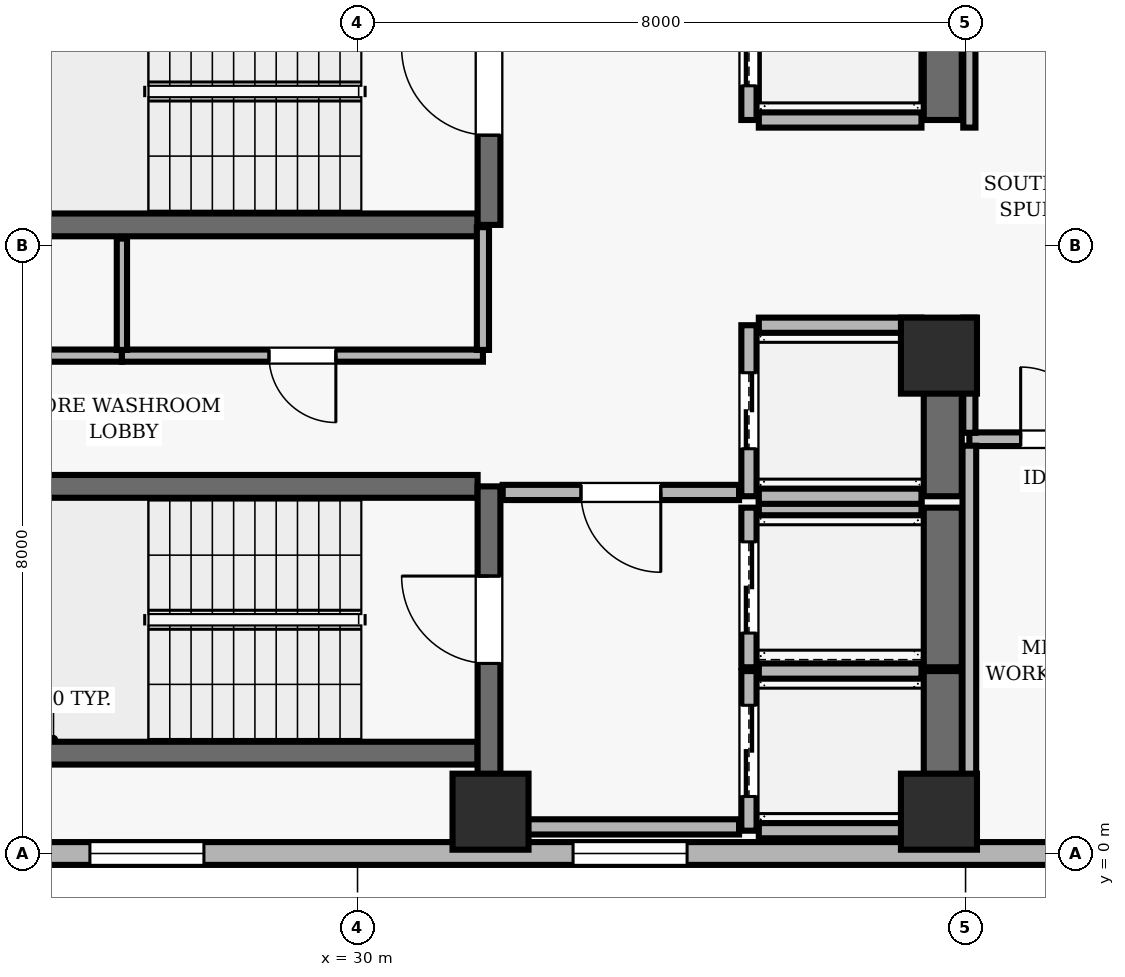
"""IFC4 building model, lengths in metres.
Left out: names, types, materials, properties, quantities, classifications, styles, units other than length and angle.
Written with IfcOpenShell. Run it as: python <this file> out.ifc"""

import sys

from ifc_helpers import new_model, si_unit, direction, frame, frame_2d, origin, origin_2d, place, context, subcontext, project, spatial, rectangle, extrude, element, fill, save


model = new_model("IFC4")
c1 = context("Model", 3, precision=1e-05, world=origin(), true_north=direction((0.0, 1.0)))
c2 = subcontext(c1, "Body", "Model", "MODEL_VIEW")
j1 = project(units=[si_unit("LENGTHUNIT", "METRE"), si_unit("PLANEANGLEUNIT", "RADIAN")], contexts=[c1])
p1 = place(None, origin())
s1 = spatial("IfcSite", under=j1, at=p1, CompositionType="ELEMENT")
p2 = place(p1, origin())
s2 = spatial("IfcBuilding", under=s1, at=p2, CompositionType="ELEMENT")
p3 = place(p2, frame((0.0, 0.0, 203.1)))
s3 = spatial("IfcBuildingStorey", under=s2, at=p3, CompositionType="ELEMENT", Elevation=203.1)
for number, where, z_axis, x_axis in (
    (1, (31.75, 0.55, 0.0), (0.0, 0.0, 1.0), (1.0, 0.0, 0.0)),
    (2, (37.65, 0.55, 0.0), (0.0, 0.0, 1.0), (1.0, 0.0, 0.0)),
    (3, (37.65, 6.55, 0.0), (0.0, 0.0, 1.0), (1.0, 0.0, 0.0)),
):
    element("IfcColumn", number, at=place(p3, frame(where, z_axis=z_axis, x_axis=x_axis)), inside=s3, PredefinedType="COLUMN", context=c2, shape_type="SweptSolid", body=[
        extrude(rectangle(XDim=1.0, YDim=1.0, at=origin_2d()), origin(), (0.0, 0.0, 1.0), 3.9),
    ])
p4 = place(p3, frame((24.5, 0.0, 0.0), z_axis=(0.0, 0.0, 1.0), x_axis=(1.0, 0.0, 0.0)))
e4 = element("IfcWall", 4, at=p4, inside=s3, PredefinedType="SOLIDWALL", context=c2, shape_type="SweptSolid", body=[
    extrude(rectangle(XDim=38.2, YDim=0.3, at=frame_2d((19.1, 0.0))), origin(), (0.0, 0.0, 1.0), 3.69),
])
p5 = place(p4, frame((1.979, 0.0, 0.9)))
e5 = element("IfcOpeningElement", 5, at=p5, cuts=e4, PredefinedType="OPENING", context=c2, shape_type="SweptSolid", body=[
    extrude(rectangle(XDim=1.5, YDim=1.6, at=frame_2d((0.75, 0.8))), frame((0.0, 0.16, 0.0), z_axis=(0.0, -1.0, 0.0), x_axis=(1.0, 0.0, 0.0)), (0.0, 0.0, 1.0), 0.32),
])
p6 = place(p4, frame((8.336, 0.0, 0.9)))
e6 = element("IfcOpeningElement", 6, at=p6, cuts=e4, PredefinedType="OPENING", context=c2, shape_type="SweptSolid", body=[
    extrude(rectangle(XDim=1.5, YDim=1.6, at=frame_2d((0.75, 0.8))), frame((0.0, 0.16, 0.0), z_axis=(0.0, -1.0, 0.0), x_axis=(1.0, 0.0, 0.0)), (0.0, 0.0, 1.0), 0.32),
])
p7 = place(p4, frame((18.35, 0.0, 0.9)))
e7 = element("IfcOpeningElement", 7, at=p7, cuts=e4, PredefinedType="OPENING", context=c2, shape_type="SweptSolid", body=[
    extrude(rectangle(XDim=1.5, YDim=1.6, at=frame_2d((0.75, 0.8))), frame((0.0, 0.16, 0.0), z_axis=(0.0, -1.0, 0.0), x_axis=(1.0, 0.0, 0.0)), (0.0, 0.0, 1.0), 0.32),
])
p8 = place(p4, frame((23.807, 0.0, 0.9)))
e8 = element("IfcOpeningElement", 8, at=p8, cuts=e4, PredefinedType="OPENING", context=c2, shape_type="SweptSolid", body=[
    extrude(rectangle(XDim=1.5, YDim=1.6, at=frame_2d((0.75, 0.8))), frame((0.0, 0.16, 0.0), z_axis=(0.0, -1.0, 0.0), x_axis=(1.0, 0.0, 0.0)), (0.0, 0.0, 1.0), 0.32),
])
p9 = place(p4, frame((29.714, 0.0, 0.9)))
e9 = element("IfcOpeningElement", 9, at=p9, cuts=e4, PredefinedType="OPENING", context=c2, shape_type="SweptSolid", body=[
    extrude(rectangle(XDim=1.5, YDim=1.6, at=frame_2d((0.75, 0.8))), frame((0.0, 0.16, 0.0), z_axis=(0.0, -1.0, 0.0), x_axis=(1.0, 0.0, 0.0)), (0.0, 0.0, 1.0), 0.32),
])
p10 = place(p4, frame((35.621, 0.0, 0.9)))
e10 = element("IfcOpeningElement", 10, at=p10, cuts=e4, PredefinedType="OPENING", context=c2, shape_type="SweptSolid", body=[
    extrude(rectangle(XDim=1.5, YDim=1.6, at=frame_2d((0.75, 0.8))), frame((0.0, 0.16, 0.0), z_axis=(0.0, -1.0, 0.0), x_axis=(1.0, 0.0, 0.0)), (0.0, 0.0, 1.0), 0.32),
])
for number, where, z_axis, x_axis in (
    (11, (31.58, 4.83, 0.0), (0.0, 0.0, 1.0), (-1.0, 0.0, 0.0)),
    (12, (23.22, 1.32, 0.0), (0.0, 0.0, 1.0), (1.0, 0.0, 0.0)),
):
    element("IfcWall", number, at=place(p3, frame(where, z_axis=z_axis, x_axis=x_axis)), inside=s3, PredefinedType="SHEAR", context=c2, shape_type="SweptSolid", body=[
        extrude(rectangle(XDim=8.36, YDim=0.3, at=frame_2d((4.18, 0.0))), origin(), (0.0, 0.0, 1.0), 3.69),
    ])
p11 = place(p3, frame((31.73, 0.96, 0.0), z_axis=(0.0, 0.0, 1.0), x_axis=(0.0, 1.0, 0.0)))
e13 = element("IfcWall", 13, at=p11, inside=s3, PredefinedType="SHEAR", context=c2, shape_type="SweptSolid", body=[
    extrude(rectangle(XDim=3.87, YDim=0.3, at=frame_2d((1.935, 0.0))), origin(), (0.0, 0.0, 1.0), 3.69),
])
p12 = place(p11, frame((1.54, 0.0, 0.0)))
e14 = element("IfcOpeningElement", 14, at=p12, cuts=e13, PredefinedType="OPENING", context=c2, shape_type="SweptSolid", body=[
    extrude(rectangle(XDim=1.15, YDim=2.15, at=frame_2d((0.575, 1.075))), frame((0.0, 0.16, 0.0), z_axis=(0.0, -1.0, 0.0), x_axis=(1.0, 0.0, 0.0)), (0.0, 0.0, 1.0), 0.32),
])
p13 = place(p3, frame((23.22, 8.27, 0.0), z_axis=(0.0, 0.0, 1.0), x_axis=(1.0, 0.0, 0.0)))
e15 = element("IfcWall", 15, at=p13, inside=s3, PredefinedType="SHEAR", context=c2, shape_type="SweptSolid", body=[
    extrude(rectangle(XDim=8.36, YDim=0.3, at=frame_2d((4.18, 0.0))), origin(), (0.0, 0.0, 1.0), 3.69),
])
p14 = place(p3, frame((31.73, 8.27, 0.0), z_axis=(0.0, 0.0, 1.0), x_axis=(0.0, 1.0, 0.0)))
e16 = element("IfcWall", 16, at=p14, inside=s3, PredefinedType="SHEAR", context=c2, shape_type="SweptSolid", body=[
    extrude(rectangle(XDim=3.51, YDim=0.3, at=frame_2d((1.755, 0.0))), origin(), (0.0, 0.0, 1.0), 3.69),
])
p15 = place(p14, frame((1.18, 0.0, 0.0)))
e17 = element("IfcOpeningElement", 17, at=p15, cuts=e16, PredefinedType="OPENING", context=c2, shape_type="SweptSolid", body=[
    extrude(rectangle(XDim=1.15, YDim=2.15, at=frame_2d((0.575, 1.075))), frame((0.0, 0.16, 0.0), z_axis=(0.0, -1.0, 0.0), x_axis=(1.0, 0.0, 0.0)), (0.0, 0.0, 1.0), 0.32),
])
p16 = place(p3, frame((35.15, 2.4, 0.0), z_axis=(0.0, 0.0, 1.0), x_axis=(0.0, -1.0, 0.0)))
e18 = element("IfcWall", 18, at=p16, inside=s3, PredefinedType="SOLIDWALL", context=c2, shape_type="SweptSolid", body=[
    extrude(rectangle(XDim=2.1, YDim=0.2, at=frame_2d((1.05, 0.0))), origin(), (0.0, 0.0, 1.0), 3.69),
])
p17 = place(p16, frame((0.45, 0.0, 0.0)))
e19 = element("IfcOpeningElement", 19, at=p17, cuts=e18, PredefinedType="OPENING", context=c2, shape_type="SweptSolid", body=[
    extrude(rectangle(XDim=1.2, YDim=2.15, at=frame_2d((0.6, 1.075))), frame((0.0, 0.11, 0.0), z_axis=(0.0, -1.0, 0.0), x_axis=(1.0, 0.0, 0.0)), (0.0, 0.0, 1.0), 0.22),
])
p18 = place(p3, frame((37.7, 0.3, 0.0), z_axis=(0.0, 0.0, 1.0), x_axis=(0.0, 1.0, 0.0)))
e20 = element("IfcWall", 20, at=p18, inside=s3, PredefinedType="SHEAR", context=c2, shape_type="SweptSolid", body=[
    extrude(rectangle(XDim=2.1, YDim=0.5, at=frame_2d((1.05, 0.0))), origin(), (0.0, 0.0, 1.0), 3.69),
])
for number, where, z_axis, x_axis in (
    (21, (35.28, 0.3, 0.0), (0.0, 0.0, 1.0), (1.0, 0.0, 0.0)),
    (22, (37.42, 2.4, 0.0), (0.0, 0.0, 1.0), (-1.0, 0.0, 0.0)),
):
    element("IfcWall", number, at=place(p3, frame(where, z_axis=z_axis, x_axis=x_axis)), inside=s3, PredefinedType="SOLIDWALL", context=c2, shape_type="SweptSolid", body=[
        extrude(rectangle(XDim=2.14, YDim=0.2, at=frame_2d((1.07, 0.0))), origin(), (0.0, 0.0, 1.0), 3.69),
    ])
p19 = place(p3, frame((35.15, 4.55, 0.0), z_axis=(0.0, 0.0, 1.0), x_axis=(0.0, -1.0, 0.0)))
e23 = element("IfcWall", 23, at=p19, inside=s3, PredefinedType="SOLIDWALL", context=c2, shape_type="SweptSolid", body=[
    extrude(rectangle(XDim=2.1, YDim=0.2, at=frame_2d((1.05, 0.0))), origin(), (0.0, 0.0, 1.0), 3.69),
])
p20 = place(p19, frame((0.45, 0.0, 0.0)))
e24 = element("IfcOpeningElement", 24, at=p20, cuts=e23, PredefinedType="OPENING", context=c2, shape_type="SweptSolid", body=[
    extrude(rectangle(XDim=1.2, YDim=2.15, at=frame_2d((0.6, 1.075))), frame((0.0, 0.11, 0.0), z_axis=(0.0, -1.0, 0.0), x_axis=(1.0, 0.0, 0.0)), (0.0, 0.0, 1.0), 0.22),
])
p21 = place(p3, frame((37.7, 2.45, 0.0), z_axis=(0.0, 0.0, 1.0), x_axis=(0.0, 1.0, 0.0)))
e25 = element("IfcWall", 25, at=p21, inside=s3, PredefinedType="SHEAR", context=c2, shape_type="SweptSolid", body=[
    extrude(rectangle(XDim=2.1, YDim=0.5, at=frame_2d((1.05, 0.0))), origin(), (0.0, 0.0, 1.0), 3.69),
])
p22 = place(p3, frame((37.42, 4.55, 0.0), z_axis=(0.0, 0.0, 1.0), x_axis=(-1.0, 0.0, 0.0)))
e26 = element("IfcWall", 26, at=p22, inside=s3, PredefinedType="SOLIDWALL", context=c2, shape_type="SweptSolid", body=[
    extrude(rectangle(XDim=2.14, YDim=0.2, at=frame_2d((1.07, 0.0))), origin(), (0.0, 0.0, 1.0), 3.69),
])
p23 = place(p3, frame((35.15, 6.95, 0.0), z_axis=(0.0, 0.0, 1.0), x_axis=(0.0, -1.0, 0.0)))
e27 = element("IfcWall", 27, at=p23, inside=s3, PredefinedType="SOLIDWALL", context=c2, shape_type="SweptSolid", body=[
    extrude(rectangle(XDim=2.25, YDim=0.2, at=frame_2d((1.125, 0.0))), origin(), (0.0, 0.0, 1.0), 3.69),
])
p24 = place(p23, frame((0.625, 0.0, 0.0)))
e28 = element("IfcOpeningElement", 28, at=p24, cuts=e27, PredefinedType="OPENING", context=c2, shape_type="SweptSolid", body=[
    extrude(rectangle(XDim=1.0, YDim=2.1, at=frame_2d((0.5, 1.05))), frame((0.0, 0.11, 0.0), z_axis=(0.0, -1.0, 0.0), x_axis=(1.0, 0.0, 0.0)), (0.0, 0.0, 1.0), 0.22),
])
p25 = place(p3, frame((37.7, 4.7, 0.0), z_axis=(0.0, 0.0, 1.0), x_axis=(0.0, 1.0, 0.0)))
e29 = element("IfcWall", 29, at=p25, inside=s3, PredefinedType="SHEAR", context=c2, shape_type="SweptSolid", body=[
    extrude(rectangle(XDim=2.25, YDim=0.5, at=frame_2d((1.125, 0.0))), origin(), (0.0, 0.0, 1.0), 3.69),
])
for number, where, z_axis, x_axis in (
    (30, (35.28, 4.7, 0.0), (0.0, 0.0, 1.0), (1.0, 0.0, 0.0)),
    (31, (37.42, 6.95, 0.0), (0.0, 0.0, 1.0), (-1.0, 0.0, 0.0)),
):
    element("IfcWall", number, at=place(p3, frame(where, z_axis=z_axis, x_axis=x_axis)), inside=s3, PredefinedType="SOLIDWALL", context=c2, shape_type="SweptSolid", body=[
        extrude(rectangle(XDim=2.14, YDim=0.2, at=frame_2d((1.07, 0.0))), origin(), (0.0, 0.0, 1.0), 3.69),
    ])
p26 = place(p3, frame((35.15, 11.55, 0.0), z_axis=(0.0, 0.0, 1.0), x_axis=(0.0, -1.0, 0.0)))
e32 = element("IfcWall", 32, at=p26, inside=s3, PredefinedType="SOLIDWALL", context=c2, shape_type="SweptSolid", body=[
    extrude(rectangle(XDim=1.9, YDim=0.2, at=frame_2d((0.95, 0.0))), origin(), (0.0, 0.0, 1.0), 3.69),
])
p27 = place(p26, frame((0.45, 0.0, 0.0)))
e33 = element("IfcOpeningElement", 33, at=p27, cuts=e32, PredefinedType="OPENING", context=c2, shape_type="SweptSolid", body=[
    extrude(rectangle(XDim=1.0, YDim=2.1, at=frame_2d((0.5, 1.05))), frame((0.0, 0.11, 0.0), z_axis=(0.0, -1.0, 0.0), x_axis=(1.0, 0.0, 0.0)), (0.0, 0.0, 1.0), 0.22),
])
p28 = place(p3, frame((37.7, 9.65, 0.0), z_axis=(0.0, 0.0, 1.0), x_axis=(0.0, 1.0, 0.0)))
e34 = element("IfcWall", 34, at=p28, inside=s3, PredefinedType="SHEAR", context=c2, shape_type="SweptSolid", body=[
    extrude(rectangle(XDim=1.9, YDim=0.5, at=frame_2d((0.95, 0.0))), origin(), (0.0, 0.0, 1.0), 3.69),
])
p29 = place(p3, frame((35.28, 9.65, 0.0), z_axis=(0.0, 0.0, 1.0), x_axis=(1.0, 0.0, 0.0)))
e35 = element("IfcWall", 35, at=p29, inside=s3, PredefinedType="SOLIDWALL", context=c2, shape_type="SweptSolid", body=[
    extrude(rectangle(XDim=2.14, YDim=0.2, at=frame_2d((1.07, 0.0))), origin(), (0.0, 0.0, 1.0), 3.69),
])
p30 = place(p3, frame((26.9, 6.55, 0.0), z_axis=(0.0, 0.0, 1.0), x_axis=(-1.0, 0.0, 0.0)))
e36 = element("IfcWall", 36, at=p30, inside=s3, PredefinedType="PARTITIONING", context=c2, shape_type="SweptSolid", body=[
    extrude(rectangle(XDim=4.7, YDim=0.16, at=frame_2d((2.35, 0.0))), origin(), (0.0, 0.0, 1.0), 3.69),
])
p31 = place(p30, frame((1.91, 0.0, 0.0)))
e37 = element("IfcOpeningElement", 37, at=p31, cuts=e36, PredefinedType="OPENING", context=c2, shape_type="SweptSolid", body=[
    extrude(rectangle(XDim=0.88, YDim=2.1, at=frame_2d((0.44, 1.05))), frame((0.0, 0.09, 0.0), z_axis=(0.0, -1.0, 0.0), x_axis=(1.0, 0.0, 0.0)), (0.0, 0.0, 1.0), 0.18),
])
p32 = place(p3, frame((31.65, 0.35, 0.0), z_axis=(0.0, 0.0, 1.0), x_axis=(1.0, 0.0, 0.0)))
e38 = element("IfcWall", 38, at=p32, inside=s3, PredefinedType="SOLIDWALL", context=c2, shape_type="SweptSolid", body=[
    extrude(rectangle(XDim=3.37, YDim=0.2, at=frame_2d((1.685, 0.0))), origin(), (0.0, 0.0, 1.0), 3.69),
])
p33 = place(p3, frame((31.65, 6.55, 0.0), z_axis=(0.0, 0.0, 1.0), x_axis=(-1.0, 0.0, 0.0)))
e39 = element("IfcWall", 39, at=p33, inside=s3, PredefinedType="PARTITIONING", context=c2, shape_type="SweptSolid", body=[
    extrude(rectangle(XDim=4.75, YDim=0.16, at=frame_2d((2.375, 0.0))), origin(), (0.0, 0.0, 1.0), 3.69),
])
p34 = place(p33, frame((1.935, 0.0, 0.0)))
e40 = element("IfcOpeningElement", 40, at=p34, cuts=e39, PredefinedType="OPENING", context=c2, shape_type="SweptSolid", body=[
    extrude(rectangle(XDim=0.88, YDim=2.1, at=frame_2d((0.44, 1.05))), frame((0.0, 0.09, 0.0), z_axis=(0.0, -1.0, 0.0), x_axis=(1.0, 0.0, 0.0)), (0.0, 0.0, 1.0), 0.18),
])
p35 = place(p3, frame((35.02, 4.75, 0.0), z_axis=(0.0, 0.0, 1.0), x_axis=(-1.0, 0.0, 0.0)))
e41 = element("IfcWall", 41, at=p35, inside=s3, PredefinedType="SOLIDWALL", context=c2, shape_type="SweptSolid", body=[
    extrude(rectangle(XDim=3.11, YDim=0.2, at=frame_2d((1.555, 0.0))), origin(), (0.0, 0.0, 1.0), 3.69),
])
p36 = place(p35, frame((1.03, 0.0, 0.0)))
e42 = element("IfcOpeningElement", 42, at=p36, cuts=e41, PredefinedType="OPENING", context=c2, shape_type="SweptSolid", body=[
    extrude(rectangle(XDim=1.05, YDim=2.15, at=frame_2d((0.525, 1.075))), frame((0.0, 0.11, 0.0), z_axis=(0.0, -1.0, 0.0), x_axis=(1.0, 0.0, 0.0)), (0.0, 0.0, 1.0), 0.22),
])
p37 = place(p3, frame((38.05, 5.45, 0.0), z_axis=(0.0, 0.0, 1.0), x_axis=(1.0, 0.0, 0.0)))
e43 = element("IfcWall", 43, at=p37, inside=s3, PredefinedType="PARTITIONING", context=c2, shape_type="SweptSolid", body=[
    extrude(rectangle(XDim=2.3, YDim=0.18, at=frame_2d((1.15, 0.0))), origin(), (0.0, 0.0, 1.0), 3.372),
])
p38 = place(p37, frame((0.675, 0.0, 0.0)))
e44 = element("IfcOpeningElement", 44, at=p38, cuts=e43, PredefinedType="OPENING", context=c2, shape_type="SweptSolid", body=[
    extrude(rectangle(XDim=0.95, YDim=2.1, at=frame_2d((0.475, 1.05))), frame((0.0, 0.1, 0.0), z_axis=(0.0, -1.0, 0.0), x_axis=(1.0, 0.0, 0.0)), (0.0, 0.0, 1.0), 0.2),
])
p39 = place(p3, frame((26.9, 6.625, 0.0), z_axis=(0.0, 0.0, 1.0), x_axis=(0.0, 1.0, 0.0)))
e45 = element("IfcWall", 45, at=p39, inside=s3, PredefinedType="PARTITIONING", context=c2, shape_type="SweptSolid", body=[
    extrude(rectangle(XDim=1.465, YDim=0.135, at=frame_2d((0.732, 0.0))), origin(), (0.0, 0.0, 1.0), 3.69),
])
p40 = place(p3, frame((31.65, 8.24, 0.0), z_axis=(0.0, 0.0, 1.0), x_axis=(0.0, -1.0, 0.0)))
e46 = element("IfcWall", 46, at=p40, inside=s3, PredefinedType="PARTITIONING", context=c2, shape_type="SweptSolid", body=[
    extrude(rectangle(XDim=1.615, YDim=0.16, at=frame_2d((0.808, 0.0))), origin(), (0.0, 0.0, 1.0), 3.69),
])
p41 = place(p3, frame((38.05, 5.365, 0.0), z_axis=(0.0, 0.0, 1.0), x_axis=(0.0, -1.0, 0.0)))
e47 = element("IfcWall", 47, at=p41, inside=s3, PredefinedType="PARTITIONING", context=c2, shape_type="SweptSolid", body=[
    extrude(rectangle(XDim=5.22, YDim=0.18, at=frame_2d((2.61, 0.0))), origin(), (0.0, 0.0, 1.0), 3.146),
])
p42 = place(p3, frame((38.05, 7.05, 0.0), z_axis=(0.0, 0.0, 1.0), x_axis=(0.0, -1.0, 0.0)))
e48 = element("IfcWall", 48, at=p42, inside=s3, PredefinedType="PARTITIONING", context=c2, shape_type="SweptSolid", body=[
    extrude(rectangle(XDim=1.515, YDim=0.16, at=frame_2d((0.758, 0.0))), origin(), (0.0, 0.0, 1.0), 3.146),
])
p43 = place(p3, frame((38.05, 15.925, 0.0), z_axis=(0.0, 0.0, 1.0), x_axis=(0.0, -1.0, 0.0)))
e49 = element("IfcWall", 49, at=p43, inside=s3, PredefinedType="PARTITIONING", context=c2, shape_type="SweptSolid", body=[
    extrude(rectangle(XDim=6.375, YDim=0.16, at=frame_2d((3.188, 0.0))), origin(), (0.0, 0.0, 1.0), 3.146),
])
p44 = place(p5, origin())
e50 = element("IfcWindow", 50, at=p44, inside=s3, PartitioningType="SINGLE_PANEL", PredefinedType="WINDOW", context=c2, shape_type="SweptSolid", body=[
    extrude(rectangle(XDim=1.5, YDim=1.6, at=frame_2d((0.75, 0.8))), frame((0.0, 0.03, 0.0), z_axis=(0.0, -1.0, 0.0), x_axis=(1.0, 0.0, 0.0)), (0.0, 0.0, 1.0), 0.06),
])
fill(e5, e50)
p45 = place(p6, origin())
e51 = element("IfcWindow", 51, at=p45, inside=s3, PartitioningType="SINGLE_PANEL", PredefinedType="WINDOW", context=c2, shape_type="SweptSolid", body=[
    extrude(rectangle(XDim=1.5, YDim=1.6, at=frame_2d((0.75, 0.8))), frame((0.0, 0.03, 0.0), z_axis=(0.0, -1.0, 0.0), x_axis=(1.0, 0.0, 0.0)), (0.0, 0.0, 1.0), 0.06),
])
fill(e6, e51)
p46 = place(p12, origin())
e52 = element("IfcDoor", 52, at=p46, inside=s3, OperationType="SINGLE_SWING_RIGHT", PredefinedType="DOOR", context=c2, shape_type="SweptSolid", body=[
    extrude(rectangle(XDim=1.15, YDim=2.15, at=frame_2d((0.575, 1.075))), frame((0.0, 0.025, 0.0), z_axis=(0.0, -1.0, 0.0), x_axis=(1.0, 0.0, 0.0)), (0.0, 0.0, 1.0), 0.05),
])
fill(e14, e52)
p47 = place(p15, origin())
e53 = element("IfcDoor", 53, at=p47, inside=s3, OperationType="SINGLE_SWING_RIGHT", PredefinedType="DOOR", context=c2, shape_type="SweptSolid", body=[
    extrude(rectangle(XDim=1.15, YDim=2.15, at=frame_2d((0.575, 1.075))), frame((0.0, 0.025, 0.0), z_axis=(0.0, -1.0, 0.0), x_axis=(1.0, 0.0, 0.0)), (0.0, 0.0, 1.0), 0.05),
])
fill(e17, e53)
p48 = place(p17, origin())
e54 = element("IfcDoor", 54, at=p48, inside=s3, OperationType="DOUBLE_DOOR_SLIDING", PredefinedType="DOOR", context=c2, shape_type="SweptSolid", body=[
    extrude(rectangle(XDim=1.2, YDim=2.15, at=frame_2d((0.6, 1.075))), frame((0.0, 0.025, 0.0), z_axis=(0.0, -1.0, 0.0), x_axis=(1.0, 0.0, 0.0)), (0.0, 0.0, 1.0), 0.05),
])
fill(e19, e54)
p49 = place(p20, origin())
e55 = element("IfcDoor", 55, at=p49, inside=s3, OperationType="DOUBLE_DOOR_SLIDING", PredefinedType="DOOR", context=c2, shape_type="SweptSolid", body=[
    extrude(rectangle(XDim=1.2, YDim=2.15, at=frame_2d((0.6, 1.075))), frame((0.0, 0.025, 0.0), z_axis=(0.0, -1.0, 0.0), x_axis=(1.0, 0.0, 0.0)), (0.0, 0.0, 1.0), 0.05),
])
fill(e24, e55)
p50 = place(p24, origin())
e56 = element("IfcDoor", 56, at=p50, inside=s3, OperationType="DOUBLE_DOOR_SLIDING", PredefinedType="DOOR", context=c2, shape_type="SweptSolid", body=[
    extrude(rectangle(XDim=1.0, YDim=2.1, at=frame_2d((0.5, 1.05))), frame((0.0, 0.025, 0.0), z_axis=(0.0, -1.0, 0.0), x_axis=(1.0, 0.0, 0.0)), (0.0, 0.0, 1.0), 0.05),
])
fill(e28, e56)
p51 = place(p27, origin())
e57 = element("IfcDoor", 57, at=p51, inside=s3, OperationType="DOUBLE_DOOR_SLIDING", PredefinedType="DOOR", context=c2, shape_type="SweptSolid", body=[
    extrude(rectangle(XDim=1.0, YDim=2.1, at=frame_2d((0.5, 1.05))), frame((0.0, 0.025, 0.0), z_axis=(0.0, -1.0, 0.0), x_axis=(1.0, 0.0, 0.0)), (0.0, 0.0, 1.0), 0.05),
])
fill(e33, e57)
p52 = place(p36, origin())
e58 = element("IfcDoor", 58, at=p52, inside=s3, OperationType="SINGLE_SWING_LEFT", PredefinedType="DOOR", context=c2, shape_type="SweptSolid", body=[
    extrude(rectangle(XDim=1.05, YDim=2.15, at=frame_2d((0.525, 1.075))), frame((0.0, 0.025, 0.0), z_axis=(0.0, -1.0, 0.0), x_axis=(1.0, 0.0, 0.0)), (0.0, 0.0, 1.0), 0.05),
])
fill(e42, e58)
p53 = place(p34, origin())
e59 = element("IfcDoor", 59, at=p53, inside=s3, OperationType="SINGLE_SWING_LEFT", PredefinedType="DOOR", context=c2, shape_type="SweptSolid", body=[
    extrude(rectangle(XDim=0.88, YDim=2.1, at=frame_2d((0.44, 1.05))), frame((0.0, 0.025, 0.0), z_axis=(0.0, -1.0, 0.0), x_axis=(1.0, 0.0, 0.0)), (0.0, 0.0, 1.0), 0.05),
])
fill(e40, e59)
p54 = place(p38, origin())
e60 = element("IfcDoor", 60, at=p54, inside=s3, OperationType="SINGLE_SWING_LEFT", PredefinedType="DOOR", context=c2, shape_type="SweptSolid", body=[
    extrude(rectangle(XDim=0.95, YDim=2.1, at=frame_2d((0.475, 1.05))), frame((0.0, 0.025, 0.0), z_axis=(0.0, -1.0, 0.0), x_axis=(1.0, 0.0, 0.0)), (0.0, 0.0, 1.0), 0.05),
])
fill(e44, e60)
save(model, sys.argv[1])
